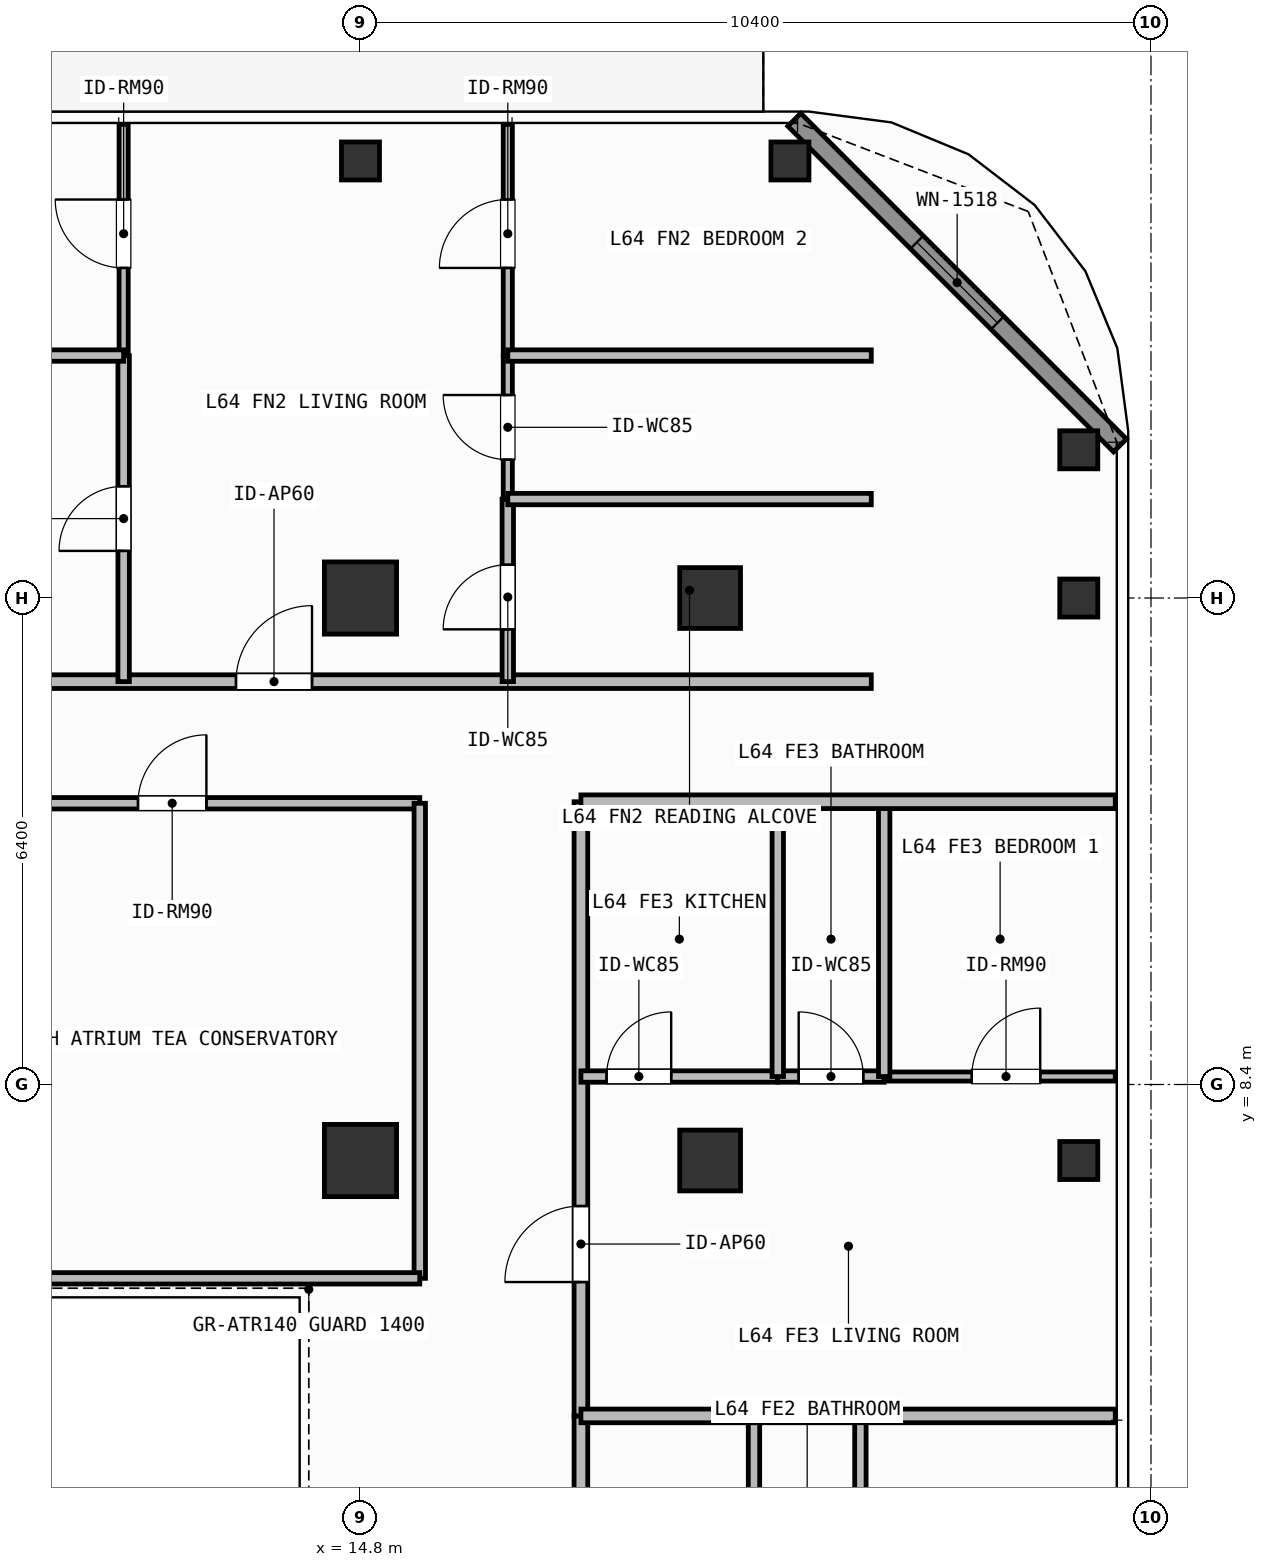
"""IFC4 building model, lengths in metres.
Left out: names, types, materials, properties, quantities, classifications, styles, units other than length and angle.
Written with IfcOpenShell. Run it as: python <this file> out.ifc"""

import sys

from ifc_helpers import new_model, si_unit, direction, frame, frame_2d, origin, origin_2d, place, context, subcontext, project, spatial, rectangle, hollow_rectangle, extrude, element, fill, save


model = new_model("IFC4")
c1 = context("Model", 3, precision=1e-05, world=origin(), true_north=direction((0.0, 1.0)))
c2 = subcontext(c1, "Body", "Model", "MODEL_VIEW")
j1 = project(units=[si_unit("LENGTHUNIT", "METRE"), si_unit("PLANEANGLEUNIT", "RADIAN")], contexts=[c1])
p1 = place(None, origin())
s1 = spatial("IfcSite", under=j1, at=p1, CompositionType="ELEMENT")
p2 = place(p1, origin())
s2 = spatial("IfcBuilding", under=s1, at=p2, CompositionType="ELEMENT")
p3 = place(p2, frame((0.0, 0.0, 262.5)))
s3 = spatial("IfcBuildingStorey", under=s2, at=p3, CompositionType="ELEMENT", Elevation=262.5)
for number, where, z_axis, x_axis in (
    (1, (14.8, 14.8, 0.0), (0.0, 0.0, 1.0), (1.0, 0.0, 0.0)),
    (2, (14.8, 7.4, 0.0), (0.0, 0.0, 1.0), (1.0, 0.0, 0.0)),
):
    element("IfcColumn", number, at=place(p3, frame(where, z_axis=z_axis, x_axis=x_axis)), inside=s3, PredefinedType="COLUMN", context=c2, shape_type="SweptSolid", body=[
        extrude(rectangle(XDim=0.95, YDim=0.95, at=origin_2d()), origin(), (0.0, 0.0, 1.0), 3.9),
    ])
for number, where, z_axis, x_axis in (
    (3, (19.4, 7.4, 0.0), (0.0, 0.0, 1.0), (1.0, 0.0, 0.0)),
    (4, (19.4, 14.8, 0.0), (0.0, 0.0, 1.0), (1.0, 0.0, 0.0)),
):
    element("IfcColumn", number, at=place(p3, frame(where, z_axis=z_axis, x_axis=x_axis)), inside=s3, PredefinedType="COLUMN", context=c2, shape_type="SweptSolid", body=[
        extrude(hollow_rectangle(XDim=0.8, YDim=0.8, WallThickness=0.036, at=origin_2d()), origin(), (0.0, 0.0, 1.0), 3.9),
    ])
for number, where, z_axis, x_axis in (
    (5, (20.45, 20.55, 0.0), (0.0, 0.0, 1.0), (1.0, 0.0, 0.0)),
    (6, (24.25, 16.75, 0.0), (0.0, 0.0, 1.0), (1.0, 0.0, 0.0)),
    (7, (14.8, 20.55, 0.0), (0.0, 0.0, 1.0), (1.0, 0.0, 0.0)),
    (8, (24.25, 7.4, 0.0), (0.0, 0.0, 1.0), (1.0, 0.0, 0.0)),
    (9, (24.25, 14.8, 0.0), (0.0, 0.0, 1.0), (1.0, 0.0, 0.0)),
):
    element("IfcColumn", number, at=place(p3, frame(where, z_axis=z_axis, x_axis=x_axis)), inside=s3, PredefinedType="COLUMN", context=c2, shape_type="SweptSolid", body=[
        extrude(hollow_rectangle(XDim=0.5, YDim=0.5, WallThickness=0.025, at=origin_2d()), origin(), (0.0, 0.0, 1.0), 3.9),
    ])
p4 = place(p3, frame((20.508, 21.092, 0.0), z_axis=(0.0, 0.0, 1.0), x_axis=(0.707126925818, -0.707086635981, 0.0)))
e10 = element("IfcWall", 10, at=p4, inside=s3, PredefinedType="SOLIDWALL", context=c2, shape_type="SweptSolid", body=[
    extrude(rectangle(XDim=6.06, YDim=0.24, at=frame_2d((3.03, 0.0))), origin(), (0.0, 0.0, 1.0), 3.68),
])
p5 = place(p4, frame((2.28, 0.0, 0.8)))
e11 = element("IfcOpeningElement", 11, at=p5, cuts=e10, PredefinedType="OPENING", context=c2, shape_type="SweptSolid", body=[
    extrude(rectangle(XDim=1.5, YDim=1.85, at=frame_2d((0.75, 0.925))), frame((0.0, 0.13, 0.0), z_axis=(0.0, -1.0, 0.0), x_axis=(1.0, 0.0, 0.0)), (0.0, 0.0, 1.0), 0.26),
])
p6 = place(p3, frame((8.36, 12.1, 0.0), z_axis=(0.0, 0.0, 1.0), x_axis=(1.0, 0.0, 0.0)))
e12 = element("IfcWall", 12, at=p6, inside=s3, PredefinedType="PARTITIONING", context=c2, shape_type="SweptSolid", body=[
    extrude(rectangle(XDim=7.22, YDim=0.15, at=frame_2d((3.61, 0.0))), origin(), (0.0, 0.0, 1.0), 3.68),
])
p7 = place(p6, frame((3.513, 0.0, 0.0)))
e13 = element("IfcOpeningElement", 13, at=p7, cuts=e12, PredefinedType="OPENING", context=c2, shape_type="SweptSolid", body=[
    extrude(rectangle(XDim=0.9, YDim=2.1, at=frame_2d((0.45, 1.05))), frame((0.0, 0.085, 0.0), z_axis=(0.0, -1.0, 0.0), x_axis=(1.0, 0.0, 0.0)), (0.0, 0.0, 1.0), 0.17),
])
p8 = place(p3, frame((7.424, 13.7, 0.0), z_axis=(0.0, 0.0, 1.0), x_axis=(1.0, 0.0, 0.0)))
e14 = element("IfcWall", 14, at=p8, inside=s3, PredefinedType="PARTITIONING", context=c2, shape_type="SweptSolid", body=[
    extrude(rectangle(XDim=14.096, YDim=0.18, at=frame_2d((7.048, 0.0))), origin(), (0.0, 0.0, 1.0), 3.68),
])
p9 = place(p8, frame((5.738, 0.0, 0.0)))
e15 = element("IfcOpeningElement", 15, at=p9, cuts=e14, PredefinedType="OPENING", context=c2, shape_type="SweptSolid", body=[
    extrude(rectangle(XDim=1.0, YDim=2.2, at=frame_2d((0.5, 1.1))), frame((0.0, 0.1, 0.0), z_axis=(0.0, -1.0, 0.0), x_axis=(1.0, 0.0, 0.0)), (0.0, 0.0, 1.0), 0.2),
])
p10 = place(p3, frame((11.684, 13.7, 0.0), z_axis=(0.0, 0.0, 1.0), x_axis=(0.0, 1.0, 0.0)))
e16 = element("IfcWall", 16, at=p10, inside=s3, PredefinedType="PARTITIONING", context=c2, shape_type="SweptSolid", body=[
    extrude(rectangle(XDim=4.29, YDim=0.15, at=frame_2d((2.145, 0.0))), origin(), (0.0, 0.0, 1.0), 3.68),
])
p11 = place(p10, frame((1.72, 0.0, 0.0)))
e17 = element("IfcOpeningElement", 17, at=p11, cuts=e16, PredefinedType="OPENING", context=c2, shape_type="SweptSolid", body=[
    extrude(rectangle(XDim=0.85, YDim=2.1, at=frame_2d((0.425, 1.05))), frame((0.0, 0.085, 0.0), z_axis=(0.0, -1.0, 0.0), x_axis=(1.0, 0.0, 0.0)), (0.0, 0.0, 1.0), 0.17),
])
p12 = place(p3, frame((11.684, 17.99, 0.0), z_axis=(0.0, 0.0, 1.0), x_axis=(0.0, 1.0, 0.0)))
e18 = element("IfcWall", 18, at=p12, inside=s3, PredefinedType="PARTITIONING", context=c2, shape_type="SweptSolid", body=[
    extrude(rectangle(XDim=3.04, YDim=0.12, at=frame_2d((1.52, 0.0))), origin(), (0.0, 0.0, 1.0), 3.68),
])
p13 = place(p12, frame((1.153, 0.0, 0.0)))
e19 = element("IfcOpeningElement", 19, at=p13, cuts=e18, PredefinedType="OPENING", context=c2, shape_type="SweptSolid", body=[
    extrude(rectangle(XDim=0.9, YDim=2.1, at=frame_2d((0.45, 1.05))), frame((0.0, 0.07, 0.0), z_axis=(0.0, -1.0, 0.0), x_axis=(1.0, 0.0, 0.0)), (0.0, 0.0, 1.0), 0.14),
])
p14 = place(p3, frame((16.738, 13.7, 0.0), z_axis=(0.0, 0.0, 1.0), x_axis=(0.0, 1.0, 0.0)))
e20 = element("IfcWall", 20, at=p14, inside=s3, PredefinedType="PARTITIONING", context=c2, shape_type="SweptSolid", body=[
    extrude(rectangle(XDim=2.402, YDim=0.15, at=frame_2d((1.201, 0.0))), origin(), (0.0, 0.0, 1.0), 3.68),
])
p15 = place(p14, frame((0.688, 0.0, 0.0)))
e21 = element("IfcOpeningElement", 21, at=p15, cuts=e20, PredefinedType="OPENING", context=c2, shape_type="SweptSolid", body=[
    extrude(rectangle(XDim=0.85, YDim=2.1, at=frame_2d((0.425, 1.05))), frame((0.0, 0.085, 0.0), z_axis=(0.0, -1.0, 0.0), x_axis=(1.0, 0.0, 0.0)), (0.0, 0.0, 1.0), 0.17),
])
p16 = place(p3, frame((16.738, 16.102, 0.0), z_axis=(0.0, 0.0, 1.0), x_axis=(0.0, 1.0, 0.0)))
e22 = element("IfcWall", 22, at=p16, inside=s3, PredefinedType="PARTITIONING", context=c2, shape_type="SweptSolid", body=[
    extrude(rectangle(XDim=1.888, YDim=0.12, at=frame_2d((0.944, 0.0))), origin(), (0.0, 0.0, 1.0), 3.68),
])
p17 = place(p16, frame((0.519, 0.0, 0.0)))
e23 = element("IfcOpeningElement", 23, at=p17, cuts=e22, PredefinedType="OPENING", context=c2, shape_type="SweptSolid", body=[
    extrude(rectangle(XDim=0.85, YDim=2.1, at=frame_2d((0.425, 1.05))), frame((0.0, 0.07, 0.0), z_axis=(0.0, -1.0, 0.0), x_axis=(1.0, 0.0, 0.0)), (0.0, 0.0, 1.0), 0.14),
])
p18 = place(p3, frame((16.738, 17.99, 0.0), z_axis=(0.0, 0.0, 1.0), x_axis=(0.0, 1.0, 0.0)))
e24 = element("IfcWall", 24, at=p18, inside=s3, PredefinedType="PARTITIONING", context=c2, shape_type="SweptSolid", body=[
    extrude(rectangle(XDim=3.04, YDim=0.12, at=frame_2d((1.52, 0.0))), origin(), (0.0, 0.0, 1.0), 3.68),
])
p19 = place(p18, frame((1.153, 0.0, 0.0)))
e25 = element("IfcOpeningElement", 25, at=p19, cuts=e24, PredefinedType="OPENING", context=c2, shape_type="SweptSolid", body=[
    extrude(rectangle(XDim=0.9, YDim=2.1, at=frame_2d((0.45, 1.05))), frame((0.0, 0.07, 0.0), z_axis=(0.0, -1.0, 0.0), x_axis=(1.0, 0.0, 0.0)), (0.0, 0.0, 1.0), 0.14),
])
p20 = place(p3, frame((17.7, -4.767, 0.0), z_axis=(0.0, 0.0, 1.0), x_axis=(0.0, 1.0, 0.0)))
e26 = element("IfcWall", 26, at=p20, inside=s3, PredefinedType="PARTITIONING", context=c2, shape_type="SweptSolid", body=[
    extrude(rectangle(XDim=8.807, YDim=0.18, at=frame_2d((4.404, 0.0))), origin(), (0.0, 0.0, 1.0), 3.68),
])
p21 = place(p20, frame((1.943, 0.0, 0.0)))
e27 = element("IfcOpeningElement", 27, at=p21, cuts=e26, PredefinedType="OPENING", context=c2, shape_type="SweptSolid", body=[
    extrude(rectangle(XDim=1.0, YDim=2.2, at=frame_2d((0.5, 1.1))), frame((0.0, 0.1, 0.0), z_axis=(0.0, -1.0, 0.0), x_axis=(1.0, 0.0, 0.0)), (0.0, 0.0, 1.0), 0.2),
])
p22 = place(p3, frame((17.7, 4.04, 0.0), z_axis=(0.0, 0.0, 1.0), x_axis=(0.0, 1.0, 0.0)))
e28 = element("IfcWall", 28, at=p22, inside=s3, PredefinedType="PARTITIONING", context=c2, shape_type="SweptSolid", body=[
    extrude(rectangle(XDim=8.08, YDim=0.18, at=frame_2d((4.04, 0.0))), origin(), (0.0, 0.0, 1.0), 3.68),
])
p23 = place(p22, frame((1.761, 0.0, 0.0)))
e29 = element("IfcOpeningElement", 29, at=p23, cuts=e28, PredefinedType="OPENING", context=c2, shape_type="SweptSolid", body=[
    extrude(rectangle(XDim=1.0, YDim=2.2, at=frame_2d((0.5, 1.1))), frame((0.0, 0.1, 0.0), z_axis=(0.0, -1.0, 0.0), x_axis=(1.0, 0.0, 0.0)), (0.0, 0.0, 1.0), 0.2),
])
p24 = place(p3, frame((17.7, 8.505, 0.0), z_axis=(0.0, 0.0, 1.0), x_axis=(1.0, 0.0, 0.0)))
e30 = element("IfcWall", 30, at=p24, inside=s3, PredefinedType="PARTITIONING", context=c2, shape_type="SweptSolid", body=[
    extrude(rectangle(XDim=2.59, YDim=0.15, at=frame_2d((1.295, 0.0))), origin(), (0.0, 0.0, 1.0), 3.68),
])
p25 = place(p24, frame((0.337, 0.0, 0.0)))
e31 = element("IfcOpeningElement", 31, at=p25, cuts=e30, PredefinedType="OPENING", context=c2, shape_type="SweptSolid", body=[
    extrude(rectangle(XDim=0.85, YDim=2.1, at=frame_2d((0.425, 1.05))), frame((0.0, 0.085, 0.0), z_axis=(0.0, -1.0, 0.0), x_axis=(1.0, 0.0, 0.0)), (0.0, 0.0, 1.0), 0.17),
])
p26 = place(p3, frame((20.29, 8.505, 0.0), z_axis=(0.0, 0.0, 1.0), x_axis=(1.0, 0.0, 0.0)))
e32 = element("IfcWall", 32, at=p26, inside=s3, PredefinedType="PARTITIONING", context=c2, shape_type="SweptSolid", body=[
    extrude(rectangle(XDim=1.4, YDim=0.15, at=frame_2d((0.7, 0.0))), origin(), (0.0, 0.0, 1.0), 3.68),
])
p27 = place(p26, frame((0.275, 0.0, 0.0)))
e33 = element("IfcOpeningElement", 33, at=p27, cuts=e32, PredefinedType="OPENING", context=c2, shape_type="SweptSolid", body=[
    extrude(rectangle(XDim=0.85, YDim=2.1, at=frame_2d((0.425, 1.05))), frame((0.0, 0.085, 0.0), z_axis=(0.0, -1.0, 0.0), x_axis=(1.0, 0.0, 0.0)), (0.0, 0.0, 1.0), 0.17),
])
p28 = place(p3, frame((21.69, 8.505, 0.0), z_axis=(0.0, 0.0, 1.0), x_axis=(1.0, 0.0, 0.0)))
e34 = element("IfcWall", 34, at=p28, inside=s3, PredefinedType="PARTITIONING", context=c2, shape_type="SweptSolid", body=[
    extrude(rectangle(XDim=3.04, YDim=0.12, at=frame_2d((1.52, 0.0))), origin(), (0.0, 0.0, 1.0), 3.68),
])
p29 = place(p28, frame((1.153, 0.0, 0.0)))
e35 = element("IfcOpeningElement", 35, at=p29, cuts=e34, PredefinedType="OPENING", context=c2, shape_type="SweptSolid", body=[
    extrude(rectangle(XDim=0.9, YDim=2.1, at=frame_2d((0.45, 1.05))), frame((0.0, 0.07, 0.0), z_axis=(0.0, -1.0, 0.0), x_axis=(1.0, 0.0, 0.0)), (0.0, 0.0, 1.0), 0.14),
])
p30 = place(p3, frame((15.58, 5.85, 0.0), z_axis=(0.0, 0.0, 1.0), x_axis=(0.0, 1.0, 0.0)))
e36 = element("IfcWall", 36, at=p30, inside=s3, PredefinedType="PARTITIONING", context=c2, shape_type="SweptSolid", body=[
    extrude(rectangle(XDim=6.25, YDim=0.15, at=frame_2d((3.125, 0.0))), origin(), (0.0, 0.0, 1.0), 3.68),
])
p31 = place(p3, frame((8.96, 5.85, 0.0), z_axis=(0.0, 0.0, 1.0), x_axis=(1.0, 0.0, 0.0)))
e37 = element("IfcWall", 37, at=p31, inside=s3, PredefinedType="PARTITIONING", context=c2, shape_type="SweptSolid", body=[
    extrude(rectangle(XDim=6.62, YDim=0.15, at=frame_2d((3.31, 0.0))), origin(), (0.0, 0.0, 1.0), 3.68),
])
p32 = place(p3, frame((7.424, 17.99, 0.0), z_axis=(0.0, 0.0, 1.0), x_axis=(1.0, 0.0, 0.0)))
e38 = element("IfcWall", 38, at=p32, inside=s3, PredefinedType="PARTITIONING", context=c2, shape_type="SweptSolid", body=[
    extrude(rectangle(XDim=4.26, YDim=0.15, at=frame_2d((2.13, 0.0))), origin(), (0.0, 0.0, 1.0), 3.68),
])
for number, where, z_axis, x_axis in (
    (39, (16.738, 16.102, 0.0), (0.0, 0.0, 1.0), (1.0, 0.0, 0.0)),
    (40, (16.738, 17.99, 0.0), (0.0, 0.0, 1.0), (1.0, 0.0, 0.0)),
):
    element("IfcWall", number, at=place(p3, frame(where, z_axis=z_axis, x_axis=x_axis)), inside=s3, PredefinedType="PARTITIONING", context=c2, shape_type="SweptSolid", body=[
        extrude(rectangle(XDim=4.782, YDim=0.15, at=frame_2d((2.391, 0.0))), origin(), (0.0, 0.0, 1.0), 3.68),
    ])
for number, where, z_axis, x_axis in (
    (41, (19.977, -0.716, 0.0), (0.0, 0.0, 1.0), (0.0, 1.0, 0.0)),
    (42, (21.377, -0.716, 0.0), (0.0, 0.0, 1.0), (0.0, 1.0, 0.0)),
):
    element("IfcWall", number, at=place(p3, frame(where, z_axis=z_axis, x_axis=x_axis)), inside=s3, PredefinedType="PARTITIONING", context=c2, shape_type="SweptSolid", body=[
        extrude(rectangle(XDim=4.756, YDim=0.15, at=frame_2d((2.378, 0.0))), origin(), (0.0, 0.0, 1.0), 3.68),
    ])
for number, where, z_axis, x_axis in (
    (43, (20.29, 8.505, 0.0), (0.0, 0.0, 1.0), (0.0, 1.0, 0.0)),
    (44, (21.69, 8.505, 0.0), (0.0, 0.0, 1.0), (0.0, 1.0, 0.0)),
):
    element("IfcWall", number, at=place(p3, frame(where, z_axis=z_axis, x_axis=x_axis)), inside=s3, PredefinedType="PARTITIONING", context=c2, shape_type="SweptSolid", body=[
        extrude(rectangle(XDim=3.615, YDim=0.15, at=frame_2d((1.808, 0.0))), origin(), (0.0, 0.0, 1.0), 3.68),
    ])
for number, where, z_axis, x_axis in (
    (45, (17.7, 4.04, 0.0), (0.0, 0.0, 1.0), (1.0, 0.0, 0.0)),
    (46, (17.7, 12.12, 0.0), (0.0, 0.0, 1.0), (1.0, 0.0, 0.0)),
):
    element("IfcWall", number, at=place(p3, frame(where, z_axis=z_axis, x_axis=x_axis)), inside=s3, PredefinedType="PARTITIONING", context=c2, shape_type="SweptSolid", body=[
        extrude(rectangle(XDim=7.03, YDim=0.18, at=frame_2d((3.515, 0.0))), origin(), (0.0, 0.0, 1.0), 3.68),
    ])
p33 = place(p5, origin())
e47 = element("IfcWindow", 47, at=p33, inside=s3, PartitioningType="SINGLE_PANEL", PredefinedType="WINDOW", context=c2, shape_type="SweptSolid", body=[
    extrude(rectangle(XDim=1.5, YDim=1.85, at=frame_2d((0.75, 0.925))), frame((0.0, 0.03, 0.0), z_axis=(0.0, -1.0, 0.0), x_axis=(1.0, 0.0, 0.0)), (0.0, 0.0, 1.0), 0.06),
])
fill(e11, e47)
p34 = place(p7, origin())
e48 = element("IfcDoor", 48, at=p34, inside=s3, OperationType="SINGLE_SWING_RIGHT", PredefinedType="DOOR", context=c2, shape_type="SweptSolid", body=[
    extrude(rectangle(XDim=0.9, YDim=2.1, at=frame_2d((0.45, 1.05))), frame((0.0, 0.025, 0.0), z_axis=(0.0, -1.0, 0.0), x_axis=(1.0, 0.0, 0.0)), (0.0, 0.0, 1.0), 0.05),
])
fill(e13, e48)
p35 = place(p9, origin())
e49 = element("IfcDoor", 49, at=p35, inside=s3, OperationType="SINGLE_SWING_RIGHT", PredefinedType="DOOR", context=c2, shape_type="SweptSolid", body=[
    extrude(rectangle(XDim=1.0, YDim=2.2, at=frame_2d((0.5, 1.1))), frame((0.0, 0.025, 0.0), z_axis=(0.0, -1.0, 0.0), x_axis=(1.0, 0.0, 0.0)), (0.0, 0.0, 1.0), 0.05),
])
fill(e15, e49)
p36 = place(p11, origin())
e50 = element("IfcDoor", 50, at=p36, inside=s3, OperationType="SINGLE_SWING_LEFT", PredefinedType="DOOR", context=c2, shape_type="SweptSolid", body=[
    extrude(rectangle(XDim=0.85, YDim=2.1, at=frame_2d((0.425, 1.05))), frame((0.0, 0.025, 0.0), z_axis=(0.0, -1.0, 0.0), x_axis=(1.0, 0.0, 0.0)), (0.0, 0.0, 1.0), 0.05),
])
fill(e17, e50)
p37 = place(p13, origin())
e51 = element("IfcDoor", 51, at=p37, inside=s3, OperationType="SINGLE_SWING_RIGHT", PredefinedType="DOOR", context=c2, shape_type="SweptSolid", body=[
    extrude(rectangle(XDim=0.9, YDim=2.1, at=frame_2d((0.45, 1.05))), frame((0.0, 0.025, 0.0), z_axis=(0.0, -1.0, 0.0), x_axis=(1.0, 0.0, 0.0)), (0.0, 0.0, 1.0), 0.05),
])
fill(e19, e51)
p38 = place(p15, origin())
e52 = element("IfcDoor", 52, at=p38, inside=s3, OperationType="SINGLE_SWING_LEFT", PredefinedType="DOOR", context=c2, shape_type="SweptSolid", body=[
    extrude(rectangle(XDim=0.85, YDim=2.1, at=frame_2d((0.425, 1.05))), frame((0.0, 0.025, 0.0), z_axis=(0.0, -1.0, 0.0), x_axis=(1.0, 0.0, 0.0)), (0.0, 0.0, 1.0), 0.05),
])
fill(e21, e52)
p39 = place(p17, origin())
e53 = element("IfcDoor", 53, at=p39, inside=s3, OperationType="SINGLE_SWING_RIGHT", PredefinedType="DOOR", context=c2, shape_type="SweptSolid", body=[
    extrude(rectangle(XDim=0.85, YDim=2.1, at=frame_2d((0.425, 1.05))), frame((0.0, 0.025, 0.0), z_axis=(0.0, -1.0, 0.0), x_axis=(1.0, 0.0, 0.0)), (0.0, 0.0, 1.0), 0.05),
])
fill(e23, e53)
p40 = place(p19, origin())
e54 = element("IfcDoor", 54, at=p40, inside=s3, OperationType="SINGLE_SWING_LEFT", PredefinedType="DOOR", context=c2, shape_type="SweptSolid", body=[
    extrude(rectangle(XDim=0.9, YDim=2.1, at=frame_2d((0.45, 1.05))), frame((0.0, 0.025, 0.0), z_axis=(0.0, -1.0, 0.0), x_axis=(1.0, 0.0, 0.0)), (0.0, 0.0, 1.0), 0.05),
])
fill(e25, e54)
p41 = place(p23, origin())
e55 = element("IfcDoor", 55, at=p41, inside=s3, OperationType="SINGLE_SWING_LEFT", PredefinedType="DOOR", context=c2, shape_type="SweptSolid", body=[
    extrude(rectangle(XDim=1.0, YDim=2.2, at=frame_2d((0.5, 1.1))), frame((0.0, 0.025, 0.0), z_axis=(0.0, -1.0, 0.0), x_axis=(1.0, 0.0, 0.0)), (0.0, 0.0, 1.0), 0.05),
])
fill(e29, e55)
p42 = place(p25, origin())
e56 = element("IfcDoor", 56, at=p42, inside=s3, OperationType="SINGLE_SWING_RIGHT", PredefinedType="DOOR", context=c2, shape_type="SweptSolid", body=[
    extrude(rectangle(XDim=0.85, YDim=2.1, at=frame_2d((0.425, 1.05))), frame((0.0, 0.025, 0.0), z_axis=(0.0, -1.0, 0.0), x_axis=(1.0, 0.0, 0.0)), (0.0, 0.0, 1.0), 0.05),
])
fill(e31, e56)
p43 = place(p27, origin())
e57 = element("IfcDoor", 57, at=p43, inside=s3, OperationType="SINGLE_SWING_LEFT", PredefinedType="DOOR", context=c2, shape_type="SweptSolid", body=[
    extrude(rectangle(XDim=0.85, YDim=2.1, at=frame_2d((0.425, 1.05))), frame((0.0, 0.025, 0.0), z_axis=(0.0, -1.0, 0.0), x_axis=(1.0, 0.0, 0.0)), (0.0, 0.0, 1.0), 0.05),
])
fill(e33, e57)
p44 = place(p29, origin())
e58 = element("IfcDoor", 58, at=p44, inside=s3, OperationType="SINGLE_SWING_RIGHT", PredefinedType="DOOR", context=c2, shape_type="SweptSolid", body=[
    extrude(rectangle(XDim=0.9, YDim=2.1, at=frame_2d((0.45, 1.05))), frame((0.0, 0.025, 0.0), z_axis=(0.0, -1.0, 0.0), x_axis=(1.0, 0.0, 0.0)), (0.0, 0.0, 1.0), 0.05),
])
fill(e35, e58)
save(model, sys.argv[1])
